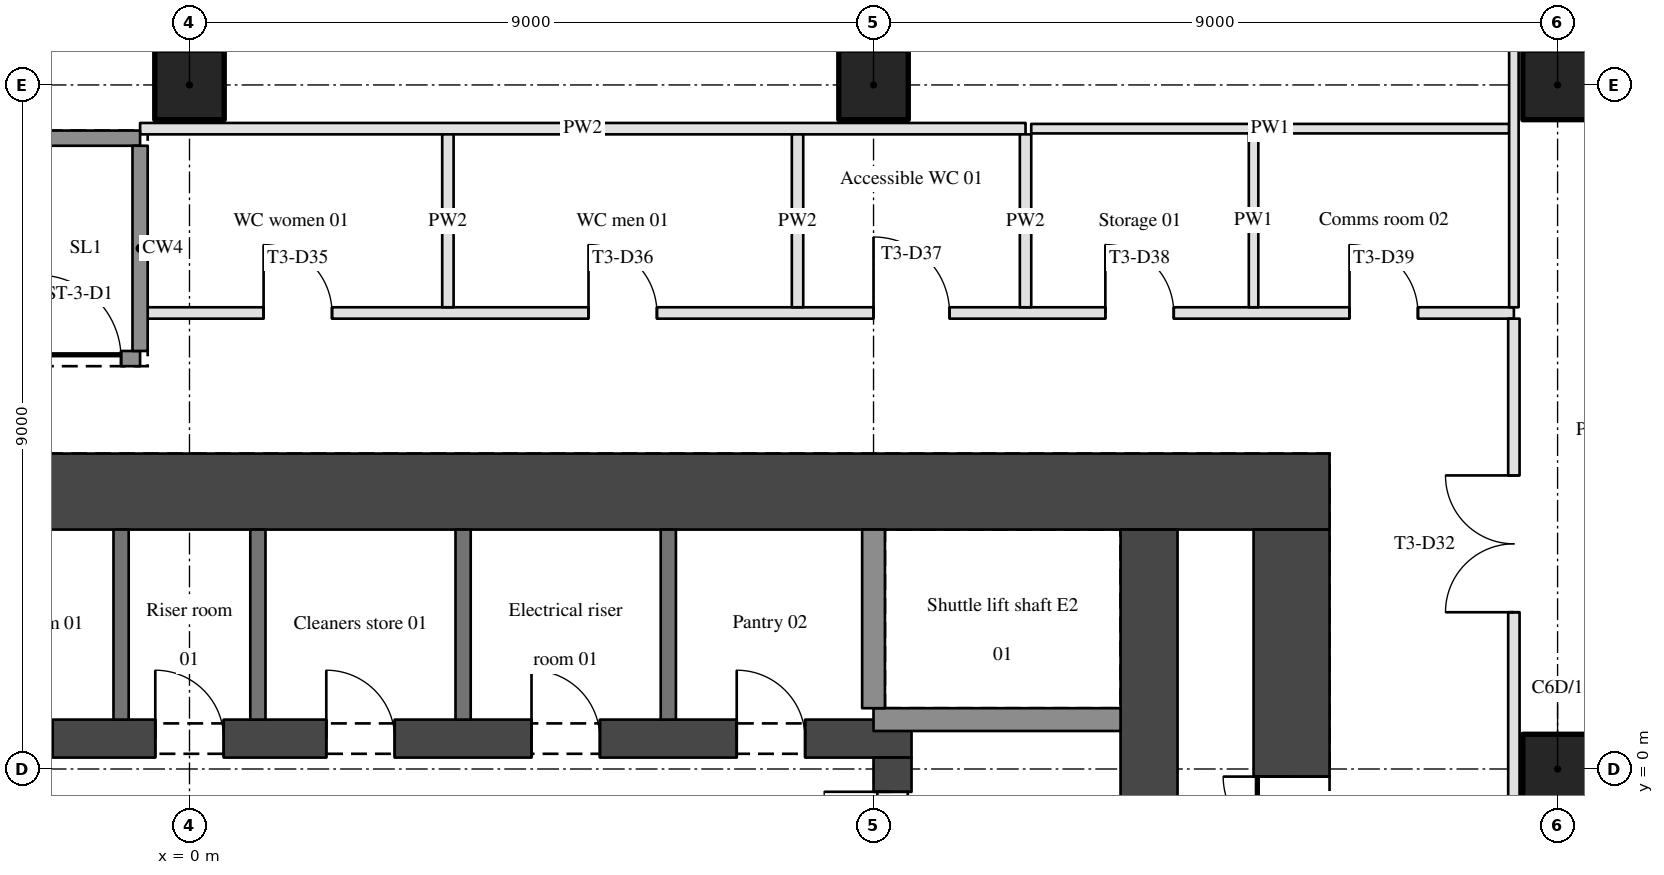
"""IFC4 building model, lengths in metres.
Left out: names, types, materials, properties, quantities, classifications, styles, units other than length and angle.
Written with IfcOpenShell. Run it as: python <this file> out.ifc"""

import sys

from ifc_helpers import new_model, si_unit, direction, frame, frame_2d, origin, origin_2d, place, context, subcontext, project, spatial, rectangle, hollow_circle, extrude, element, fill, save


model = new_model("IFC4")
c1 = context("Model", 3, precision=1e-05, world=origin(), true_north=direction((0.0, 1.0)))
c2 = subcontext(c1, "Body", "Model", "MODEL_VIEW")
j1 = project(units=[si_unit("LENGTHUNIT", "METRE"), si_unit("PLANEANGLEUNIT", "RADIAN")], contexts=[c1])
p1 = place(None, origin())
s1 = spatial("IfcSite", under=j1, at=p1, CompositionType="ELEMENT")
p2 = place(p1, origin())
s2 = spatial("IfcBuilding", under=s1, at=p2, CompositionType="ELEMENT")
p3 = place(p2, frame((0.0, 0.0, 53.7)))
s3 = spatial("IfcBuildingStorey", under=s2, at=p3, CompositionType="ELEMENT", Elevation=53.7)
for number, where, z_axis, x_axis in (
    (1, (0.0, 9.0, 0.0), (0.0, 0.0, 1.0), (1.0, 0.0, 0.0)),
    (2, (9.0, 9.0, 0.0), (0.0, 0.0, 1.0), (1.0, 0.0, 0.0)),
    (3, (18.0, 0.0, 0.0), (0.0, 0.0, 1.0), (1.0, 0.0, 0.0)),
    (4, (18.0, 9.0, 0.0), (0.0, 0.0, 1.0), (1.0, 0.0, 0.0)),
):
    element("IfcColumn", number, at=place(p3, frame(where, z_axis=z_axis, x_axis=x_axis)), inside=s3, PredefinedType="COLUMN", context=c2, shape_type="SweptSolid", body=[
        extrude(hollow_circle(Radius=0.457, WallThickness=0.05, at=origin_2d()), origin(), (0.0, 0.0, 1.0), 3.9),
    ])
p4 = place(p3, frame((-15.0, 3.65, 0.0), z_axis=(0.0, 0.0, 1.0), x_axis=(1.0, 0.0, 0.0)))
e5 = element("IfcWall", 5, at=p4, inside=s3, PredefinedType="SHEAR", context=c2, shape_type="SweptSolid", body=[
    extrude(rectangle(XDim=30.0, YDim=1.0, at=frame_2d((15.0, 0.0))), origin(), (0.0, 0.0, 1.0), 3.9),
])
p5 = place(p3, frame((14.5, -11.5, 0.0), z_axis=(0.0, 0.0, 1.0), x_axis=(0.0, 1.0, 0.0)))
e6 = element("IfcWall", 6, at=p5, inside=s3, PredefinedType="SHEAR", context=c2, shape_type="SweptSolid", body=[
    extrude(rectangle(XDim=14.65, YDim=1.0, at=frame_2d((7.325, 0.0))), origin(), (0.0, 0.0, 1.0), 3.9),
])
p6 = place(p5, frame((9.6, 0.0, 0.0)))
e7 = element("IfcOpeningElement", 7, at=p6, cuts=e6, PredefinedType="OPENING", context=c2, shape_type="SweptSolid", body=[
    extrude(rectangle(XDim=1.8, YDim=2.1, at=frame_2d((0.9, 1.05))), frame((0.0, 0.51, 0.0), z_axis=(0.0, -1.0, 0.0), x_axis=(1.0, 0.0, 0.0)), (0.0, 0.0, 1.0), 1.02),
])
p7 = place(p3, frame((12.625, -11.5, 0.0), z_axis=(0.0, 0.0, 1.0), x_axis=(0.0, 1.0, 0.0)))
e8 = element("IfcWall", 8, at=p7, inside=s3, PredefinedType="SHEAR", context=c2, shape_type="SweptSolid", body=[
    extrude(rectangle(XDim=14.65, YDim=0.75, at=frame_2d((7.325, 0.0))), origin(), (0.0, 0.0, 1.0), 3.9),
])
p8 = place(p7, frame((10.05, 0.0, 0.0)))
e9 = element("IfcOpeningElement", 9, at=p8, cuts=e8, PredefinedType="OPENING", context=c2, shape_type="SweptSolid", body=[
    extrude(rectangle(XDim=0.9, YDim=2.1, at=frame_2d((0.45, 1.05))), frame((0.0, 0.385, 0.0), z_axis=(0.0, -1.0, 0.0), x_axis=(1.0, 0.0, 0.0)), (0.0, 0.0, 1.0), 0.77),
])
p9 = place(p3, frame((-9.5, 0.4, 0.0), z_axis=(0.0, 0.0, 1.0), x_axis=(1.0, 0.0, 0.0)))
e10 = element("IfcWall", 10, at=p9, inside=s3, PredefinedType="SHEAR", context=c2, shape_type="SweptSolid", body=[
    extrude(rectangle(XDim=19.0, YDim=0.5, at=frame_2d((9.5, 0.0))), origin(), (0.0, 0.0, 1.0), 3.9),
])
p10 = place(p9, frame((1.4, 0.0, 0.0)))
e11 = element("IfcOpeningElement", 11, at=p10, cuts=e10, PredefinedType="OPENING", context=c2, shape_type="SweptSolid", body=[
    extrude(rectangle(XDim=0.9, YDim=2.1, at=frame_2d((0.45, 1.05))), frame((0.0, 0.26, 0.0), z_axis=(0.0, -1.0, 0.0), x_axis=(1.0, 0.0, 0.0)), (0.0, 0.0, 1.0), 0.52),
])
p11 = place(p9, frame((4.1, 0.0, 0.0)))
e12 = element("IfcOpeningElement", 12, at=p11, cuts=e10, PredefinedType="OPENING", context=c2, shape_type="SweptSolid", body=[
    extrude(rectangle(XDim=0.9, YDim=2.1, at=frame_2d((0.45, 1.05))), frame((0.0, 0.26, 0.0), z_axis=(0.0, -1.0, 0.0), x_axis=(1.0, 0.0, 0.0)), (0.0, 0.0, 1.0), 0.52),
])
p12 = place(p9, frame((6.8, 0.0, 0.0)))
e13 = element("IfcOpeningElement", 13, at=p12, cuts=e10, PredefinedType="OPENING", context=c2, shape_type="SweptSolid", body=[
    extrude(rectangle(XDim=0.9, YDim=2.1, at=frame_2d((0.45, 1.05))), frame((0.0, 0.26, 0.0), z_axis=(0.0, -1.0, 0.0), x_axis=(1.0, 0.0, 0.0)), (0.0, 0.0, 1.0), 0.52),
])
p13 = place(p9, frame((11.3, 0.0, 0.0)))
e14 = element("IfcOpeningElement", 14, at=p13, cuts=e10, PredefinedType="OPENING", context=c2, shape_type="SweptSolid", body=[
    extrude(rectangle(XDim=0.9, YDim=2.1, at=frame_2d((0.45, 1.05))), frame((0.0, 0.26, 0.0), z_axis=(0.0, -1.0, 0.0), x_axis=(1.0, 0.0, 0.0)), (0.0, 0.0, 1.0), 0.52),
])
p14 = place(p9, frame((14.0, 0.0, 0.0)))
e15 = element("IfcOpeningElement", 15, at=p14, cuts=e10, PredefinedType="OPENING", context=c2, shape_type="SweptSolid", body=[
    extrude(rectangle(XDim=0.9, YDim=2.1, at=frame_2d((0.45, 1.05))), frame((0.0, 0.26, 0.0), z_axis=(0.0, -1.0, 0.0), x_axis=(1.0, 0.0, 0.0)), (0.0, 0.0, 1.0), 0.52),
])
p15 = place(p9, frame((16.7, 0.0, 0.0)))
e16 = element("IfcOpeningElement", 16, at=p15, cuts=e10, PredefinedType="OPENING", context=c2, shape_type="SweptSolid", body=[
    extrude(rectangle(XDim=0.9, YDim=2.1, at=frame_2d((0.45, 1.05))), frame((0.0, 0.26, 0.0), z_axis=(0.0, -1.0, 0.0), x_axis=(1.0, 0.0, 0.0)), (0.0, 0.0, 1.0), 0.52),
])
p16 = place(p9, frame((9.05, 0.0, 0.0)))
e17 = element("IfcOpeningElement", 17, at=p16, cuts=e10, PredefinedType="OPENING", context=c2, shape_type="SweptSolid", body=[
    extrude(rectangle(XDim=0.9, YDim=2.1, at=frame_2d((0.45, 1.05))), frame((0.0, 0.26, 0.0), z_axis=(0.0, -1.0, 0.0), x_axis=(1.0, 0.0, 0.0)), (0.0, 0.0, 1.0), 0.52),
])
p17 = place(p3, frame((9.25, -11.5, 0.0), z_axis=(0.0, 0.0, 1.0), x_axis=(0.0, 1.0, 0.0)))
e18 = element("IfcWall", 18, at=p17, inside=s3, PredefinedType="SHEAR", context=c2, shape_type="SweptSolid", body=[
    extrude(rectangle(XDim=11.65, YDim=0.5, at=frame_2d((5.825, 0.0))), origin(), (0.0, 0.0, 1.0), 3.9),
])
p18 = place(p17, frame((9.4, 0.0, 0.0)))
e19 = element("IfcOpeningElement", 19, at=p18, cuts=e18, PredefinedType="OPENING", context=c2, shape_type="SweptSolid", body=[
    extrude(rectangle(XDim=1.8, YDim=2.1, at=frame_2d((0.9, 1.05))), frame((0.0, 0.26, 0.0), z_axis=(0.0, -1.0, 0.0), x_axis=(1.0, 0.0, 0.0)), (0.0, 0.0, 1.0), 0.52),
])
p19 = place(p17, frame((5.25, 0.0, 0.0)))
e20 = element("IfcOpeningElement", 20, at=p19, cuts=e18, PredefinedType="OPENING", context=c2, shape_type="SweptSolid", body=[
    extrude(rectangle(XDim=1.1, YDim=2.1, at=frame_2d((0.55, 1.05))), frame((0.0, 0.26, 0.0), z_axis=(0.0, -1.0, 0.0), x_axis=(1.0, 0.0, 0.0)), (0.0, 0.0, 1.0), 0.52),
])
p20 = place(p3, frame((12.25, 0.65, 0.0), z_axis=(0.0, 0.0, 1.0), x_axis=(-1.0, 0.0, 0.0)))
e21 = element("IfcWall", 21, at=p20, inside=s3, PredefinedType="SHEAR", context=c2, shape_type="SweptSolid", body=[
    extrude(rectangle(XDim=3.25, YDim=0.3, at=frame_2d((1.625, 0.0))), origin(), (0.0, 0.0, 1.0), 3.9),
])
p21 = place(p3, frame((-7.25, 5.4, 0.0), z_axis=(0.0, 0.0, 1.0), x_axis=(1.0, 0.0, 0.0)))
e22 = element("IfcWall", 22, at=p21, inside=s3, PredefinedType="SHEAR", context=c2, shape_type="SweptSolid", body=[
    extrude(rectangle(XDim=6.6, YDim=0.2, at=frame_2d((3.3, 0.0))), origin(), (0.0, 0.0, 1.0), 3.9),
])
p22 = place(p21, frame((5.25, 0.0, 0.0)))
e23 = element("IfcOpeningElement", 23, at=p22, cuts=e22, PredefinedType="OPENING", context=c2, shape_type="SweptSolid", body=[
    extrude(rectangle(XDim=1.1, YDim=2.1, at=frame_2d((0.55, 1.05))), frame((0.0, 0.11, 0.0), z_axis=(0.0, -1.0, 0.0), x_axis=(1.0, 0.0, 0.0)), (0.0, 0.0, 1.0), 0.22),
])
p23 = place(p3, frame((-0.55, 6.0, 0.0), z_axis=(0.0, 0.0, 1.0), x_axis=(1.0, 0.0, 0.0)))
e24 = element("IfcWall", 24, at=p23, inside=s3, PredefinedType="PARTITIONING", context=c2, shape_type="SweptSolid", body=[
    extrude(rectangle(XDim=17.975, YDim=0.15, at=frame_2d((8.988, 0.0))), origin(), (0.0, 0.0, 1.0), 2.96),
])
p24 = place(p23, frame((1.525, 0.0, 0.0)))
e25 = element("IfcOpeningElement", 25, at=p24, cuts=e24, PredefinedType="OPENING", context=c2, shape_type="SweptSolid", body=[
    extrude(rectangle(XDim=0.9, YDim=2.1, at=frame_2d((0.45, 1.05))), frame((0.0, 0.085, 0.0), z_axis=(0.0, -1.0, 0.0), x_axis=(1.0, 0.0, 0.0)), (0.0, 0.0, 1.0), 0.17),
])
p25 = place(p23, frame((5.8, 0.0, 0.0)))
e26 = element("IfcOpeningElement", 26, at=p25, cuts=e24, PredefinedType="OPENING", context=c2, shape_type="SweptSolid", body=[
    extrude(rectangle(XDim=0.9, YDim=2.1, at=frame_2d((0.45, 1.05))), frame((0.0, 0.085, 0.0), z_axis=(0.0, -1.0, 0.0), x_axis=(1.0, 0.0, 0.0)), (0.0, 0.0, 1.0), 0.17),
])
p26 = place(p23, frame((9.55, 0.0, 0.0)))
e27 = element("IfcOpeningElement", 27, at=p26, cuts=e24, PredefinedType="OPENING", context=c2, shape_type="SweptSolid", body=[
    extrude(rectangle(XDim=1.0, YDim=2.1, at=frame_2d((0.5, 1.05))), frame((0.0, 0.085, 0.0), z_axis=(0.0, -1.0, 0.0), x_axis=(1.0, 0.0, 0.0)), (0.0, 0.0, 1.0), 0.17),
])
p27 = place(p23, frame((12.6, 0.0, 0.0)))
e28 = element("IfcOpeningElement", 28, at=p27, cuts=e24, PredefinedType="OPENING", context=c2, shape_type="SweptSolid", body=[
    extrude(rectangle(XDim=0.9, YDim=2.1, at=frame_2d((0.45, 1.05))), frame((0.0, 0.085, 0.0), z_axis=(0.0, -1.0, 0.0), x_axis=(1.0, 0.0, 0.0)), (0.0, 0.0, 1.0), 0.17),
])
p28 = place(p23, frame((15.812, 0.0, 0.0)))
e29 = element("IfcOpeningElement", 29, at=p28, cuts=e24, PredefinedType="OPENING", context=c2, shape_type="SweptSolid", body=[
    extrude(rectangle(XDim=0.9, YDim=2.1, at=frame_2d((0.45, 1.05))), frame((0.0, 0.085, 0.0), z_axis=(0.0, -1.0, 0.0), x_axis=(1.0, 0.0, 0.0)), (0.0, 0.0, 1.0), 0.17),
])
p29 = place(p3, frame((-7.25, 8.3, 0.0), z_axis=(0.0, 0.0, 1.0), x_axis=(1.0, 0.0, 0.0)))
e30 = element("IfcWall", 30, at=p29, inside=s3, PredefinedType="SHEAR", context=c2, shape_type="SweptSolid", body=[
    extrude(rectangle(XDim=6.6, YDim=0.2, at=frame_2d((3.3, 0.0))), origin(), (0.0, 0.0, 1.0), 3.9),
])
p30 = place(p3, frame((-0.65, 8.425, 0.0), z_axis=(0.0, 0.0, 1.0), x_axis=(1.0, 0.0, 0.0)))
e31 = element("IfcWall", 31, at=p30, inside=s3, PredefinedType="PARTITIONING", context=c2, shape_type="SweptSolid", body=[
    extrude(rectangle(XDim=11.65, YDim=0.15, at=frame_2d((5.825, 0.0))), origin(), (0.0, 0.0, 1.0), 2.96),
])
p31 = place(p3, frame((11.075, 8.425, 0.0), z_axis=(0.0, 0.0, 1.0), x_axis=(1.0, 0.0, 0.0)))
e32 = element("IfcWall", 32, at=p31, inside=s3, PredefinedType="PARTITIONING", context=c2, shape_type="SweptSolid", body=[
    extrude(rectangle(XDim=6.288, YDim=0.125, at=frame_2d((3.144, 0.0))), origin(), (0.0, 0.0, 1.0), 2.96),
])
p32 = place(p3, frame((-0.9, 0.65, 0.0), z_axis=(0.0, 0.0, 1.0), x_axis=(0.0, 1.0, 0.0)))
e33 = element("IfcWall", 33, at=p32, inside=s3, PredefinedType="SOLIDWALL", context=c2, shape_type="SweptSolid", body=[
    extrude(rectangle(XDim=2.5, YDim=0.2, at=frame_2d((1.25, 0.0))), origin(), (0.0, 0.0, 1.0), 3.6),
])
p33 = place(p3, frame((-0.65, 5.5, 0.0), z_axis=(0.0, 0.0, 1.0), x_axis=(0.0, 1.0, 0.0)))
e34 = element("IfcWall", 34, at=p33, inside=s3, PredefinedType="SHEAR", context=c2, shape_type="SweptSolid", body=[
    extrude(rectangle(XDim=2.7, YDim=0.2, at=frame_2d((1.35, 0.0))), origin(), (0.0, 0.0, 1.0), 3.9),
])
p34 = place(p3, frame((0.9, 0.65, 0.0), z_axis=(0.0, 0.0, 1.0), x_axis=(0.0, 1.0, 0.0)))
e35 = element("IfcWall", 35, at=p34, inside=s3, PredefinedType="SOLIDWALL", context=c2, shape_type="SweptSolid", body=[
    extrude(rectangle(XDim=2.5, YDim=0.2, at=frame_2d((1.25, 0.0))), origin(), (0.0, 0.0, 1.0), 3.6),
])
p35 = place(p3, frame((3.4, 6.075, 0.0), z_axis=(0.0, 0.0, 1.0), x_axis=(0.0, 1.0, 0.0)))
e36 = element("IfcWall", 36, at=p35, inside=s3, PredefinedType="PARTITIONING", context=c2, shape_type="SweptSolid", body=[
    extrude(rectangle(XDim=2.275, YDim=0.15, at=frame_2d((1.138, 0.0))), origin(), (0.0, 0.0, 1.0), 2.96),
])
for number, where, z_axis, x_axis in (
    (37, (3.6, 0.65, 0.0), (0.0, 0.0, 1.0), (0.0, 1.0, 0.0)),
    (38, (6.3, 0.65, 0.0), (0.0, 0.0, 1.0), (0.0, 1.0, 0.0)),
):
    element("IfcWall", number, at=place(p3, frame(where, z_axis=z_axis, x_axis=x_axis)), inside=s3, PredefinedType="SOLIDWALL", context=c2, shape_type="SweptSolid", body=[
        extrude(rectangle(XDim=2.5, YDim=0.2, at=frame_2d((1.25, 0.0))), origin(), (0.0, 0.0, 1.0), 3.6),
    ])
p36 = place(p3, frame((8.0, 6.075, 0.0), z_axis=(0.0, 0.0, 1.0), x_axis=(0.0, 1.0, 0.0)))
e39 = element("IfcWall", 39, at=p36, inside=s3, PredefinedType="PARTITIONING", context=c2, shape_type="SweptSolid", body=[
    extrude(rectangle(XDim=2.275, YDim=0.15, at=frame_2d((1.138, 0.0))), origin(), (0.0, 0.0, 1.0), 2.96),
])
p37 = place(p3, frame((9.0, 0.8, 0.0), z_axis=(0.0, 0.0, 1.0), x_axis=(0.0, 1.0, 0.0)))
e40 = element("IfcWall", 40, at=p37, inside=s3, PredefinedType="SHEAR", context=c2, shape_type="SweptSolid", body=[
    extrude(rectangle(XDim=2.35, YDim=0.3, at=frame_2d((1.175, 0.0))), origin(), (0.0, 0.0, 1.0), 3.9),
])
p38 = place(p3, frame((11.0, 6.075, 0.0), z_axis=(0.0, 0.0, 1.0), x_axis=(0.0, 1.0, 0.0)))
e41 = element("IfcWall", 41, at=p38, inside=s3, PredefinedType="PARTITIONING", context=c2, shape_type="SweptSolid", body=[
    extrude(rectangle(XDim=2.275, YDim=0.15, at=frame_2d((1.138, 0.0))), origin(), (0.0, 0.0, 1.0), 2.96),
])
p39 = place(p3, frame((14.0, 6.075, 0.0), z_axis=(0.0, 0.0, 1.0), x_axis=(0.0, 1.0, 0.0)))
e42 = element("IfcWall", 42, at=p39, inside=s3, PredefinedType="PARTITIONING", context=c2, shape_type="SweptSolid", body=[
    extrude(rectangle(XDim=2.288, YDim=0.125, at=frame_2d((1.144, 0.0))), origin(), (0.0, 0.0, 1.0), 2.96),
])
p40 = place(p3, frame((17.425, -14.925, 0.0), z_axis=(0.0, 0.0, 1.0), x_axis=(0.0, 1.0, 0.0)))
e43 = element("IfcWall", 43, at=p40, inside=s3, PredefinedType="PARTITIONING", context=c2, shape_type="SweptSolid", body=[
    extrude(rectangle(XDim=20.85, YDim=0.15, at=frame_2d((10.425, 0.0))), origin(), (0.0, 0.0, 1.0), 2.96),
])
p41 = place(p40, frame((6.562, 0.0, 0.0)))
e44 = element("IfcOpeningElement", 44, at=p41, cuts=e43, PredefinedType="OPENING", context=c2, shape_type="SweptSolid", body=[
    extrude(rectangle(XDim=1.8, YDim=2.1, at=frame_2d((0.9, 1.05))), frame((0.0, 0.085, 0.0), z_axis=(0.0, -1.0, 0.0), x_axis=(1.0, 0.0, 0.0)), (0.0, 0.0, 1.0), 0.17),
])
p42 = place(p40, frame((8.663, 0.0, 0.0)))
e45 = element("IfcOpeningElement", 45, at=p42, cuts=e43, PredefinedType="OPENING", context=c2, shape_type="SweptSolid", body=[
    extrude(rectangle(XDim=1.8, YDim=2.1, at=frame_2d((0.9, 1.05))), frame((0.0, 0.085, 0.0), z_axis=(0.0, -1.0, 0.0), x_axis=(1.0, 0.0, 0.0)), (0.0, 0.0, 1.0), 0.17),
])
p43 = place(p40, frame((16.988, 0.0, 0.0)))
e46 = element("IfcOpeningElement", 46, at=p43, cuts=e43, PredefinedType="OPENING", context=c2, shape_type="SweptSolid", body=[
    extrude(rectangle(XDim=1.8, YDim=2.1, at=frame_2d((0.9, 1.05))), frame((0.0, 0.085, 0.0), z_axis=(0.0, -1.0, 0.0), x_axis=(1.0, 0.0, 0.0)), (0.0, 0.0, 1.0), 0.17),
])
p44 = place(p3, frame((17.425, 6.075, 0.0), z_axis=(0.0, 0.0, 1.0), x_axis=(0.0, 1.0, 0.0)))
e47 = element("IfcWall", 47, at=p44, inside=s3, PredefinedType="PARTITIONING", context=c2, shape_type="SweptSolid", body=[
    extrude(rectangle(XDim=19.982, YDim=0.125, at=frame_2d((9.991, 0.0))), origin(), (0.0, 0.0, 1.0), 2.96),
])
p45 = place(p43, origin())
e48 = element("IfcDoor", 48, at=p45, inside=s3, OperationType="DOUBLE_DOOR_SINGLE_SWING", PredefinedType="DOOR", context=c2, shape_type="SweptSolid", body=[
    extrude(rectangle(XDim=1.8, YDim=2.1, at=frame_2d((0.9, 1.05))), frame((0.0, 0.025, 0.0), z_axis=(0.0, -1.0, 0.0), x_axis=(1.0, 0.0, 0.0)), (0.0, 0.0, 1.0), 0.05),
])
fill(e46, e48)
p46 = place(p6, origin())
e49 = element("IfcDoor", 49, at=p46, inside=s3, OperationType="DOUBLE_DOOR_SINGLE_SWING", PredefinedType="DOOR", context=c2, shape_type="SweptSolid", body=[
    extrude(rectangle(XDim=1.8, YDim=2.1, at=frame_2d((0.9, 1.05))), frame((0.0, 0.025, 0.0), z_axis=(0.0, -1.0, 0.0), x_axis=(1.0, 0.0, 0.0)), (0.0, 0.0, 1.0), 0.05),
])
fill(e7, e49)
p47 = place(p18, origin())
e50 = element("IfcDoor", 50, at=p47, inside=s3, OperationType="DOUBLE_DOOR_SINGLE_SWING", PredefinedType="DOOR", context=c2, shape_type="SweptSolid", body=[
    extrude(rectangle(XDim=1.8, YDim=2.1, at=frame_2d((0.9, 1.05))), frame((0.0, 0.025, 0.0), z_axis=(0.0, -1.0, 0.0), x_axis=(1.0, 0.0, 0.0)), (0.0, 0.0, 1.0), 0.05),
])
fill(e19, e50)
p48 = place(p22, origin())
e51 = element("IfcDoor", 51, at=p48, inside=s3, OperationType="SINGLE_SWING_LEFT", PredefinedType="DOOR", context=c2, shape_type="SweptSolid", body=[
    extrude(rectangle(XDim=1.1, YDim=2.1, at=frame_2d((0.55, 1.05))), frame((0.0, 0.025, 0.0), z_axis=(0.0, -1.0, 0.0), x_axis=(1.0, 0.0, 0.0)), (0.0, 0.0, 1.0), 0.05),
])
fill(e23, e51)
p49 = place(p13, origin())
e52 = element("IfcDoor", 52, at=p49, inside=s3, OperationType="SINGLE_SWING_LEFT", PredefinedType="DOOR", context=c2, shape_type="SweptSolid", body=[
    extrude(rectangle(XDim=0.9, YDim=2.1, at=frame_2d((0.45, 1.05))), frame((0.0, 0.025, 0.0), z_axis=(0.0, -1.0, 0.0), x_axis=(1.0, 0.0, 0.0)), (0.0, 0.0, 1.0), 0.05),
])
fill(e14, e52)
p50 = place(p14, origin())
e53 = element("IfcDoor", 53, at=p50, inside=s3, OperationType="SINGLE_SWING_LEFT", PredefinedType="DOOR", context=c2, shape_type="SweptSolid", body=[
    extrude(rectangle(XDim=0.9, YDim=2.1, at=frame_2d((0.45, 1.05))), frame((0.0, 0.025, 0.0), z_axis=(0.0, -1.0, 0.0), x_axis=(1.0, 0.0, 0.0)), (0.0, 0.0, 1.0), 0.05),
])
fill(e15, e53)
p51 = place(p15, origin())
e54 = element("IfcDoor", 54, at=p51, inside=s3, OperationType="SINGLE_SWING_LEFT", PredefinedType="DOOR", context=c2, shape_type="SweptSolid", body=[
    extrude(rectangle(XDim=0.9, YDim=2.1, at=frame_2d((0.45, 1.05))), frame((0.0, 0.025, 0.0), z_axis=(0.0, -1.0, 0.0), x_axis=(1.0, 0.0, 0.0)), (0.0, 0.0, 1.0), 0.05),
])
fill(e16, e54)
p52 = place(p16, origin())
e55 = element("IfcDoor", 55, at=p52, inside=s3, OperationType="SINGLE_SWING_LEFT", PredefinedType="DOOR", context=c2, shape_type="SweptSolid", body=[
    extrude(rectangle(XDim=0.9, YDim=2.1, at=frame_2d((0.45, 1.05))), frame((0.0, 0.025, 0.0), z_axis=(0.0, -1.0, 0.0), x_axis=(1.0, 0.0, 0.0)), (0.0, 0.0, 1.0), 0.05),
])
fill(e17, e55)
p53 = place(p24, origin())
e56 = element("IfcDoor", 56, at=p53, inside=s3, OperationType="SINGLE_SWING_LEFT", PredefinedType="DOOR", context=c2, shape_type="SweptSolid", body=[
    extrude(rectangle(XDim=0.9, YDim=2.1, at=frame_2d((0.45, 1.05))), frame((0.0, 0.025, 0.0), z_axis=(0.0, -1.0, 0.0), x_axis=(1.0, 0.0, 0.0)), (0.0, 0.0, 1.0), 0.05),
])
fill(e25, e56)
p54 = place(p25, origin())
e57 = element("IfcDoor", 57, at=p54, inside=s3, OperationType="SINGLE_SWING_LEFT", PredefinedType="DOOR", context=c2, shape_type="SweptSolid", body=[
    extrude(rectangle(XDim=0.9, YDim=2.1, at=frame_2d((0.45, 1.05))), frame((0.0, 0.025, 0.0), z_axis=(0.0, -1.0, 0.0), x_axis=(1.0, 0.0, 0.0)), (0.0, 0.0, 1.0), 0.05),
])
fill(e26, e57)
p55 = place(p26, origin())
e58 = element("IfcDoor", 58, at=p55, inside=s3, OperationType="SINGLE_SWING_LEFT", PredefinedType="DOOR", context=c2, shape_type="SweptSolid", body=[
    extrude(rectangle(XDim=1.0, YDim=2.1, at=frame_2d((0.5, 1.05))), frame((0.0, 0.025, 0.0), z_axis=(0.0, -1.0, 0.0), x_axis=(1.0, 0.0, 0.0)), (0.0, 0.0, 1.0), 0.05),
])
fill(e27, e58)
p56 = place(p27, origin())
e59 = element("IfcDoor", 59, at=p56, inside=s3, OperationType="SINGLE_SWING_LEFT", PredefinedType="DOOR", context=c2, shape_type="SweptSolid", body=[
    extrude(rectangle(XDim=0.9, YDim=2.1, at=frame_2d((0.45, 1.05))), frame((0.0, 0.025, 0.0), z_axis=(0.0, -1.0, 0.0), x_axis=(1.0, 0.0, 0.0)), (0.0, 0.0, 1.0), 0.05),
])
fill(e28, e59)
p57 = place(p28, origin())
e60 = element("IfcDoor", 60, at=p57, inside=s3, OperationType="SINGLE_SWING_LEFT", PredefinedType="DOOR", context=c2, shape_type="SweptSolid", body=[
    extrude(rectangle(XDim=0.9, YDim=2.1, at=frame_2d((0.45, 1.05))), frame((0.0, 0.025, 0.0), z_axis=(0.0, -1.0, 0.0), x_axis=(1.0, 0.0, 0.0)), (0.0, 0.0, 1.0), 0.05),
])
fill(e29, e60)
save(model, sys.argv[1])
